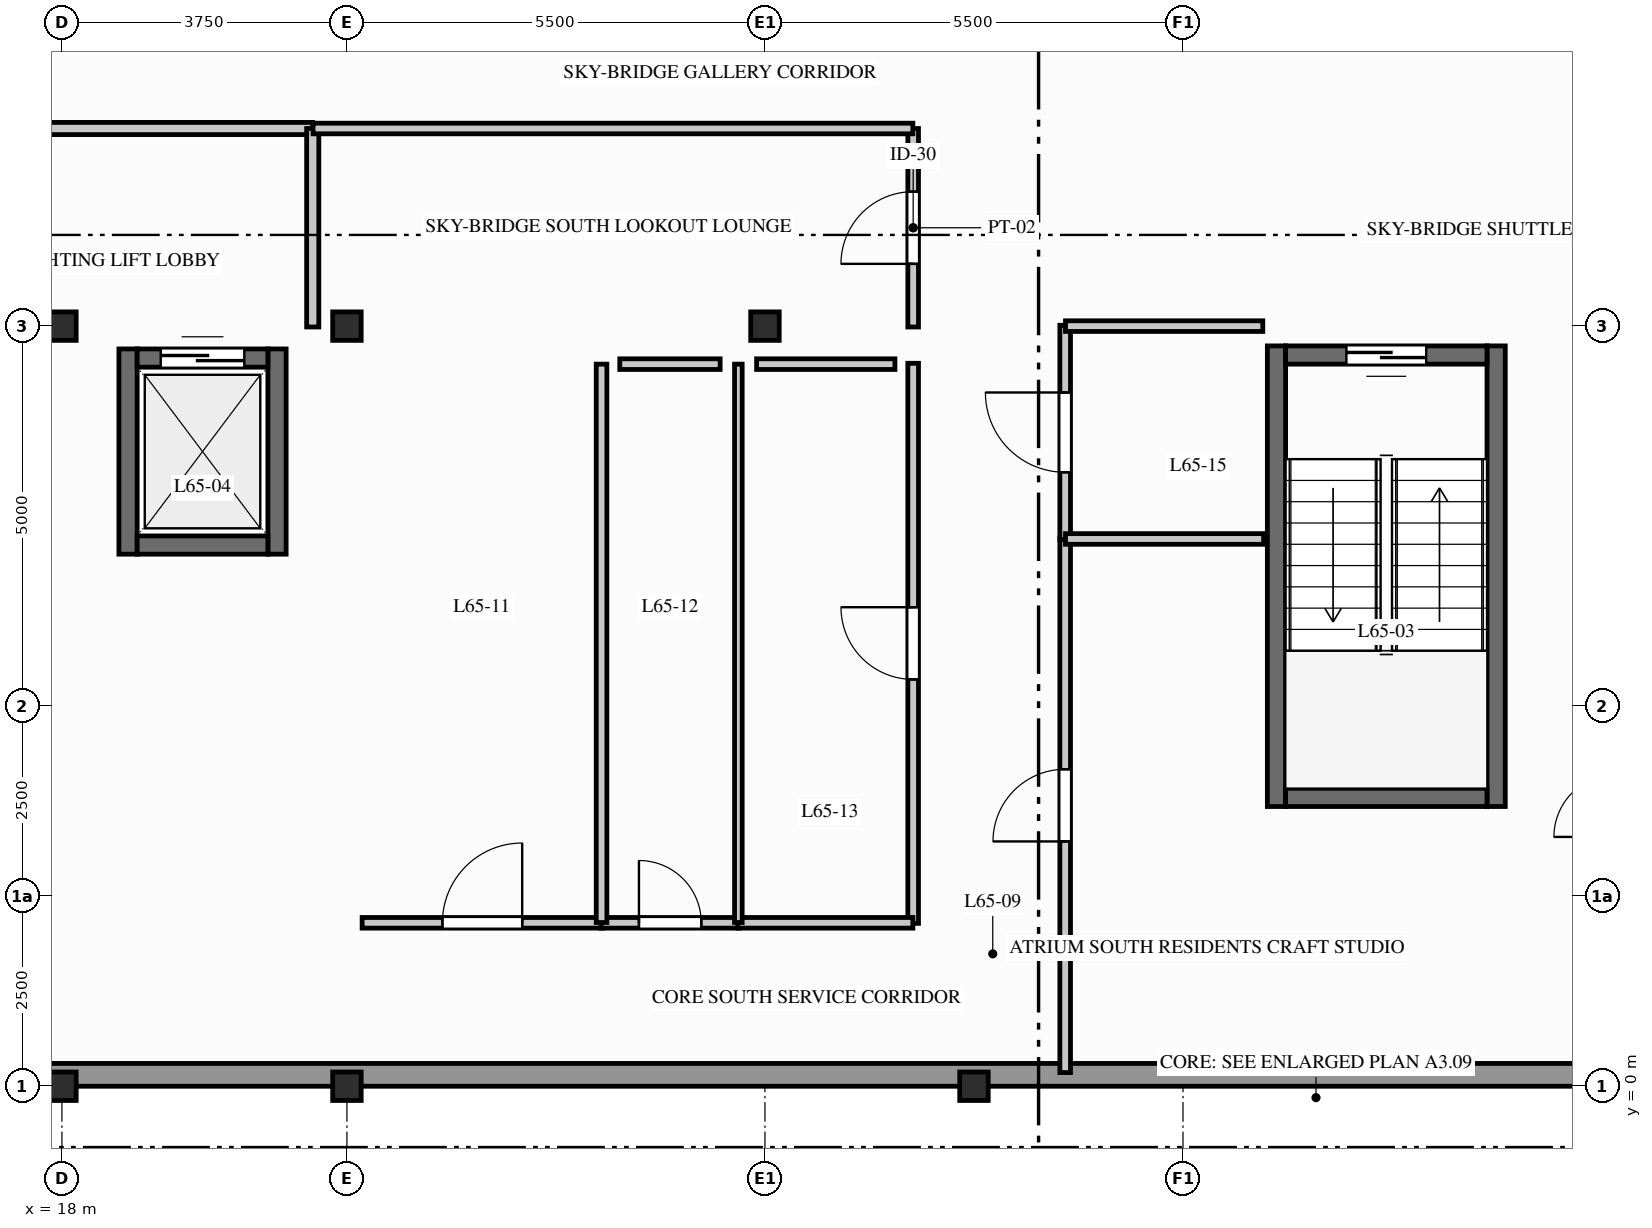
"""IFC4 building model, lengths in metres.
Left out: names, types, materials, properties, quantities, classifications, styles, units other than length and angle.
Written with IfcOpenShell. Run it as: python <this file> out.ifc"""

import sys

from ifc_helpers import new_model, si_unit, direction, frame, frame_2d, origin, origin_2d, place, context, subcontext, project, spatial, rectangle, i_section, extrude, element, fill, save


model = new_model("IFC4")
c1 = context("Model", 3, precision=1e-05, world=origin(), true_north=direction((0.0, 1.0)))
c2 = subcontext(c1, "Body", "Model", "MODEL_VIEW")
j1 = project(units=[si_unit("LENGTHUNIT", "METRE"), si_unit("PLANEANGLEUNIT", "RADIAN")], contexts=[c1])
p1 = place(None, origin())
s1 = spatial("IfcSite", under=j1, at=p1, CompositionType="ELEMENT")
p2 = place(p1, origin())
s2 = spatial("IfcBuilding", under=s1, at=p2, CompositionType="ELEMENT")
p3 = place(p2, frame((0.0, 0.0, 214.4)))
s3 = spatial("IfcBuildingStorey", under=s2, at=p3, CompositionType="ELEMENT", Elevation=214.4)
for number, where, z_axis, x_axis in (
    (1, (18.0, 0.0, 0.0), (0.0, 0.0, 1.0), (1.0, 0.0, 0.0)),
    (2, (18.0, 10.0, 0.0), (0.0, 0.0, 1.0), (1.0, 0.0, 0.0)),
    (3, (21.75, 0.0, 0.0), (0.0, 0.0, 1.0), (1.0, 0.0, 0.0)),
    (4, (21.75, 10.0, 0.0), (0.0, 0.0, 1.0), (1.0, 0.0, 0.0)),
):
    element("IfcColumn", number, at=place(p3, frame(where, z_axis=z_axis, x_axis=x_axis)), inside=s3, PredefinedType="COLUMN", context=c2, shape_type="SweptSolid", body=[
        extrude(i_section(OverallWidth=0.375, OverallDepth=0.375, WebThickness=0.017, FlangeThickness=0.027, FilletRadius=0.015, at=origin_2d()), origin(), (0.0, 0.0, 1.0), 3.6),
    ])
for number, where, z_axis, x_axis in (
    (5, (27.25, 10.0, -0.42), (0.0, 0.0, 1.0), (1.0, 0.0, 0.0)),
    (6, (30.0, 0.0, -0.42), (0.0, 0.0, 1.0), (1.0, 0.0, 0.0)),
):
    element("IfcColumn", number, at=place(p3, frame(where, z_axis=z_axis, x_axis=x_axis)), inside=s3, PredefinedType="COLUMN", context=c2, shape_type="SweptSolid", body=[
        extrude(i_section(OverallWidth=0.375, OverallDepth=0.375, WebThickness=0.017, FlangeThickness=0.027, FilletRadius=0.015, at=origin_2d()), origin(), (0.0, 0.0, 1.0), 4.02),
    ])
p4 = place(p3, frame((2.5, 0.15, 0.0), z_axis=(0.0, 0.0, 1.0), x_axis=(1.0, 0.0, 0.0)))
e7 = element("IfcWall", 7, at=p4, inside=s3, PredefinedType="STANDARD", context=c2, shape_type="SweptSolid", body=[
    extrude(rectangle(XDim=55.0, YDim=0.3, at=frame_2d((27.5, 0.0))), origin(), (0.0, 0.0, 1.0), 2.454),
])
p5 = place(p4, frame((4.85, 0.0, 0.0)))
e8 = element("IfcOpeningElement", 8, at=p5, cuts=e7, PredefinedType="OPENING", context=c2, shape_type="SweptSolid", body=[
    extrude(rectangle(XDim=1.1, YDim=2.2, at=frame_2d((0.55, 1.1))), frame((0.0, 0.16, 0.0), z_axis=(0.0, -1.0, 0.0), x_axis=(1.0, 0.0, 0.0)), (0.0, 0.0, 1.0), 0.32),
])
p6 = place(p4, frame((1.0, 0.0, 0.434)))
e9 = element("IfcOpeningElement", 9, at=p6, cuts=e7, PredefinedType="OPENING", context=c2, shape_type="SweptSolid", body=[
    extrude(rectangle(XDim=1.5, YDim=1.8, at=frame_2d((0.75, 0.9))), frame((0.0, 0.16, 0.0), z_axis=(0.0, -1.0, 0.0), x_axis=(1.0, 0.0, 0.0)), (0.0, 0.0, 1.0), 0.32),
])
p7 = place(p4, frame((47.2, 0.0, 0.334)))
e10 = element("IfcOpeningElement", 10, at=p7, cuts=e7, PredefinedType="OPENING", context=c2, shape_type="SweptSolid", body=[
    extrude(rectangle(XDim=1.65, YDim=1.9, at=frame_2d((0.825, 0.95))), frame((0.0, 0.16, 0.0), z_axis=(0.0, -1.0, 0.0), x_axis=(1.0, 0.0, 0.0)), (0.0, 0.0, 1.0), 0.32),
])
p8 = place(p4, frame((52.3, 0.0, 0.634)))
e11 = element("IfcOpeningElement", 11, at=p8, cuts=e7, PredefinedType="OPENING", context=c2, shape_type="SweptSolid", body=[
    extrude(rectangle(XDim=1.2, YDim=1.6, at=frame_2d((0.6, 0.8))), frame((0.0, 0.16, 0.0), z_axis=(0.0, -1.0, 0.0), x_axis=(1.0, 0.0, 0.0)), (0.0, 0.0, 1.0), 0.32),
])
for number, where, z_axis, x_axis in (
    (12, (33.98, 3.68, 0.0), (0.0, 0.0, 1.0), (0.0, 1.0, 0.0)),
    (13, (36.87, 3.68, 0.0), (0.0, 0.0, 1.0), (0.0, 1.0, 0.0)),
):
    element("IfcWall", number, at=place(p3, frame(where, z_axis=z_axis, x_axis=x_axis)), inside=s3, PredefinedType="SHEAR", context=c2, shape_type="SweptSolid", body=[
        extrude(rectangle(XDim=6.06, YDim=0.24, at=frame_2d((3.03, 0.0))), origin(), (0.0, 0.0, 1.0), 3.33),
    ])
p9 = place(p3, frame((34.1, 3.8, 0.0), z_axis=(0.0, 0.0, 1.0), x_axis=(1.0, 0.0, 0.0)))
e14 = element("IfcWall", 14, at=p9, inside=s3, PredefinedType="SHEAR", context=c2, shape_type="SweptSolid", body=[
    extrude(rectangle(XDim=2.65, YDim=0.24, at=frame_2d((1.325, 0.0))), origin(), (0.0, 0.0, 1.0), 3.33),
])
p10 = place(p3, frame((36.75, 9.62, 0.0), z_axis=(0.0, 0.0, 1.0), x_axis=(-1.0, 0.0, 0.0)))
e15 = element("IfcWall", 15, at=p10, inside=s3, PredefinedType="SHEAR", context=c2, shape_type="SweptSolid", body=[
    extrude(rectangle(XDim=2.65, YDim=0.24, at=frame_2d((1.325, 0.0))), origin(), (0.0, 0.0, 1.0), 3.33),
])
p11 = place(p10, frame((0.8, 0.0, 0.0)))
e16 = element("IfcOpeningElement", 16, at=p11, cuts=e15, PredefinedType="OPENING", context=c2, shape_type="SweptSolid", body=[
    extrude(rectangle(XDim=1.05, YDim=2.06, at=frame_2d((0.525, 1.03))), frame((0.0, 0.13, 0.0), z_axis=(0.0, -1.0, 0.0), x_axis=(1.0, 0.0, 0.0)), (0.0, 0.0, 1.0), 0.26),
])
for number, where, z_axis, x_axis in (
    (17, (18.87, 7.0, 0.0), (0.0, 0.0, 1.0), (0.0, 1.0, 0.0)),
    (18, (20.83, 7.0, 0.0), (0.0, 0.0, 1.0), (0.0, 1.0, 0.0)),
):
    element("IfcWall", number, at=place(p3, frame(where, z_axis=z_axis, x_axis=x_axis)), inside=s3, PredefinedType="SHEAR", context=c2, shape_type="SweptSolid", body=[
        extrude(rectangle(XDim=2.7, YDim=0.24, at=frame_2d((1.35, 0.0))), origin(), (0.0, 0.0, 1.0), 3.33),
    ])
p12 = place(p3, frame((18.99, 7.12, 0.0), z_axis=(0.0, 0.0, 1.0), x_axis=(1.0, 0.0, 0.0)))
e19 = element("IfcWall", 19, at=p12, inside=s3, PredefinedType="SHEAR", context=c2, shape_type="SweptSolid", body=[
    extrude(rectangle(XDim=1.72, YDim=0.24, at=frame_2d((0.86, 0.0))), origin(), (0.0, 0.0, 1.0), 3.33),
])
p13 = place(p3, frame((18.99, 9.58, 0.0), z_axis=(0.0, 0.0, 1.0), x_axis=(1.0, 0.0, 0.0)))
e20 = element("IfcWall", 20, at=p13, inside=s3, PredefinedType="SHEAR", context=c2, shape_type="SweptSolid", body=[
    extrude(rectangle(XDim=1.72, YDim=0.24, at=frame_2d((0.86, 0.0))), origin(), (0.0, 0.0, 1.0), 3.33),
])
p14 = place(p13, frame((0.31, 0.0, 0.0)))
e21 = element("IfcOpeningElement", 21, at=p14, cuts=e20, PredefinedType="OPENING", context=c2, shape_type="SweptSolid", body=[
    extrude(rectangle(XDim=1.1, YDim=2.06, at=frame_2d((0.55, 1.03))), frame((0.0, 0.13, 0.0), z_axis=(0.0, -1.0, 0.0), x_axis=(1.0, 0.0, 0.0)), (0.0, 0.0, 1.0), 0.26),
])
p15 = place(p3, frame((29.2, 2.143, 0.0), z_axis=(0.0, 0.0, 1.0), x_axis=(0.0, 1.0, 0.0)))
e22 = element("IfcWall", 22, at=p15, inside=s3, PredefinedType="PARTITIONING", context=c2, shape_type="SweptSolid", body=[
    extrude(rectangle(XDim=7.369, YDim=0.14, at=frame_2d((3.684, 0.0))), origin(), (0.0, 0.0, 1.0), 3.33),
])
p16 = place(p15, frame((3.209, 0.0, 0.0)))
e23 = element("IfcOpeningElement", 23, at=p16, cuts=e22, PredefinedType="OPENING", context=c2, shape_type="SweptSolid", body=[
    extrude(rectangle(XDim=0.95, YDim=2.05, at=frame_2d((0.475, 1.025))), frame((0.0, 0.08, 0.0), z_axis=(0.0, -1.0, 0.0), x_axis=(1.0, 0.0, 0.0)), (0.0, 0.0, 1.0), 0.16),
])
p17 = place(p3, frame((31.2, 0.18, 0.0), z_axis=(0.0, 0.0, 1.0), x_axis=(0.0, 1.0, 0.0)))
e24 = element("IfcWall", 24, at=p17, inside=s3, PredefinedType="PARTITIONING", context=c2, shape_type="SweptSolid", body=[
    extrude(rectangle(XDim=7.031, YDim=0.14, at=frame_2d((3.516, 0.0))), origin(), (0.0, 0.0, 1.0), 3.33),
])
p18 = place(p17, frame((3.041, 0.0, 0.0)))
e25 = element("IfcOpeningElement", 25, at=p18, cuts=e24, PredefinedType="OPENING", context=c2, shape_type="SweptSolid", body=[
    extrude(rectangle(XDim=0.95, YDim=2.05, at=frame_2d((0.475, 1.025))), frame((0.0, 0.08, 0.0), z_axis=(0.0, -1.0, 0.0), x_axis=(1.0, 0.0, 0.0)), (0.0, 0.0, 1.0), 0.16),
])
p19 = place(p3, frame((31.2, 7.193, 0.0), z_axis=(0.0, 0.0, 1.0), x_axis=(0.0, 1.0, 0.0)))
e26 = element("IfcWall", 26, at=p19, inside=s3, PredefinedType="PARTITIONING", context=c2, shape_type="SweptSolid", body=[
    extrude(rectangle(XDim=2.819, YDim=0.14, at=frame_2d((1.409, 0.0))), origin(), (0.0, 0.0, 1.0), 2.454),
])
p20 = place(p19, frame((0.884, 0.0, 0.0)))
e27 = element("IfcOpeningElement", 27, at=p20, cuts=e26, PredefinedType="OPENING", context=c2, shape_type="SweptSolid", body=[
    extrude(rectangle(XDim=1.05, YDim=2.06, at=frame_2d((0.525, 1.03))), frame((0.0, 0.08, 0.0), z_axis=(0.0, -1.0, 0.0), x_axis=(1.0, 0.0, 0.0)), (0.0, 0.0, 1.0), 0.16),
])
p21 = place(p3, frame((29.2, 9.989, 0.0), z_axis=(0.0, 0.0, 1.0), x_axis=(0.0, 1.0, 0.0)))
e28 = element("IfcWall", 28, at=p21, inside=s3, PredefinedType="PARTITIONING", context=c2, shape_type="SweptSolid", body=[
    extrude(rectangle(XDim=2.611, YDim=0.14, at=frame_2d((1.306, 0.0))), origin(), (0.0, 0.0, 1.0), 2.454),
])
p22 = place(p21, frame((0.831, 0.0, 0.0)))
e29 = element("IfcOpeningElement", 29, at=p22, cuts=e28, PredefinedType="OPENING", context=c2, shape_type="SweptSolid", body=[
    extrude(rectangle(XDim=0.95, YDim=2.05, at=frame_2d((0.475, 1.025))), frame((0.0, 0.08, 0.0), z_axis=(0.0, -1.0, 0.0), x_axis=(1.0, 0.0, 0.0)), (0.0, 0.0, 1.0), 0.16),
])
p23 = place(p3, frame((21.95, 2.15, 0.0), z_axis=(0.0, 0.0, 1.0), x_axis=(1.0, 0.0, 0.0)))
e30 = element("IfcWall", 30, at=p23, inside=s3, PredefinedType="PARTITIONING", context=c2, shape_type="SweptSolid", body=[
    extrude(rectangle(XDim=3.161, YDim=0.14, at=frame_2d((1.581, 0.0))), origin(), (0.0, 0.0, 1.0), 3.33),
])
p24 = place(p23, frame((1.056, 0.0, 0.0)))
e31 = element("IfcOpeningElement", 31, at=p24, cuts=e30, PredefinedType="OPENING", context=c2, shape_type="SweptSolid", body=[
    extrude(rectangle(XDim=1.05, YDim=2.06, at=frame_2d((0.525, 1.03))), frame((0.0, 0.08, 0.0), z_axis=(0.0, -1.0, 0.0), x_axis=(1.0, 0.0, 0.0)), (0.0, 0.0, 1.0), 0.16),
])
p25 = place(p3, frame((25.093, 2.15, 0.0), z_axis=(0.0, 0.0, 1.0), x_axis=(1.0, 0.0, 0.0)))
e32 = element("IfcWall", 32, at=p25, inside=s3, PredefinedType="PARTITIONING", context=c2, shape_type="SweptSolid", body=[
    extrude(rectangle(XDim=1.819, YDim=0.14, at=frame_2d((0.909, 0.0))), origin(), (0.0, 0.0, 1.0), 3.33),
])
p26 = place(p25, frame((0.499, 0.0, 0.0)))
e33 = element("IfcOpeningElement", 33, at=p26, cuts=e32, PredefinedType="OPENING", context=c2, shape_type="SweptSolid", body=[
    extrude(rectangle(XDim=0.82, YDim=2.02, at=frame_2d((0.41, 1.01))), frame((0.0, 0.08, 0.0), z_axis=(0.0, -1.0, 0.0), x_axis=(1.0, 0.0, 0.0)), (0.0, 0.0, 1.0), 0.16),
])
p27 = place(p3, frame((26.893, 2.15, 0.0), z_axis=(0.0, 0.0, 1.0), x_axis=(1.0, 0.0, 0.0)))
e34 = element("IfcWall", 34, at=p27, inside=s3, PredefinedType="PARTITIONING", context=c2, shape_type="SweptSolid", body=[
    extrude(rectangle(XDim=2.303, YDim=0.14, at=frame_2d((1.152, 0.0))), origin(), (0.0, 0.0, 1.0), 3.33),
])
p28 = place(p3, frame((25.1, 2.154, 0.0), z_axis=(0.0, 0.0, 1.0), x_axis=(0.0, 1.0, 0.0)))
e35 = element("IfcWall", 35, at=p28, inside=s3, PredefinedType="PARTITIONING", context=c2, shape_type="SweptSolid", body=[
    extrude(rectangle(XDim=7.346, YDim=0.14, at=frame_2d((3.673, 0.0))), origin(), (0.0, 0.0, 1.0), 3.33),
])
p29 = place(p3, frame((26.9, 2.154, 0.0), z_axis=(0.0, 0.0, 1.0), x_axis=(0.0, 1.0, 0.0)))
e36 = element("IfcWall", 36, at=p29, inside=s3, PredefinedType="PARTITIONING", context=c2, shape_type="SweptSolid", body=[
    extrude(rectangle(XDim=7.346, YDim=0.1, at=frame_2d((3.673, 0.0))), origin(), (0.0, 0.0, 1.0), 3.33),
])
p30 = place(p3, frame((31.204, 7.2, 0.0), z_axis=(0.0, 0.0, 1.0), x_axis=(1.0, 0.0, 0.0)))
e37 = element("IfcWall", 37, at=p30, inside=s3, PredefinedType="PARTITIONING", context=c2, shape_type="SweptSolid", body=[
    extrude(rectangle(XDim=2.607, YDim=0.14, at=frame_2d((1.304, 0.0))), origin(), (0.0, 0.0, 1.0), 3.33),
])
p31 = place(p3, frame((31.204, 10.0, 0.0), z_axis=(0.0, 0.0, 1.0), x_axis=(1.0, 0.0, 0.0)))
e38 = element("IfcWall", 38, at=p31, inside=s3, PredefinedType="PARTITIONING", context=c2, shape_type="SweptSolid", body=[
    extrude(rectangle(XDim=2.596, YDim=0.14, at=frame_2d((1.298, 0.0))), origin(), (0.0, 0.0, 1.0), 2.454),
])
p32 = place(p3, frame((12.3, 12.6, 0.0), z_axis=(0.0, 0.0, 1.0), x_axis=(1.0, 0.0, 0.0)))
e39 = element("IfcWall", 39, at=p32, inside=s3, PredefinedType="PARTITIONING", context=c2, shape_type="SweptSolid", body=[
    extrude(rectangle(XDim=9.0, YDim=0.16, at=frame_2d((4.5, 0.0))), origin(), (0.0, 0.0, 1.0), 2.685),
])
p33 = place(p32, frame((3.975, 0.0, 0.0)))
e40 = element("IfcOpeningElement", 40, at=p33, cuts=e39, PredefinedType="OPENING", context=c2, shape_type="SweptSolid", body=[
    extrude(rectangle(XDim=1.05, YDim=2.06, at=frame_2d((0.525, 1.03))), frame((0.0, 0.09, 0.0), z_axis=(0.0, -1.0, 0.0), x_axis=(1.0, 0.0, 0.0)), (0.0, 0.0, 1.0), 0.18),
])
p34 = place(p3, frame((21.3, 9.989, 0.0), z_axis=(0.0, 0.0, 1.0), x_axis=(0.0, 1.0, 0.0)))
e41 = element("IfcWall", 41, at=p34, inside=s3, PredefinedType="PARTITIONING", context=c2, shape_type="SweptSolid", body=[
    extrude(rectangle(XDim=2.611, YDim=0.16, at=frame_2d((1.306, 0.0))), origin(), (0.0, 0.0, 1.0), 2.685),
])
p35 = place(p3, frame((21.304, 12.6, 0.0), z_axis=(0.0, 0.0, 1.0), x_axis=(1.0, 0.0, 0.0)))
e42 = element("IfcWall", 42, at=p35, inside=s3, PredefinedType="PARTITIONING", context=c2, shape_type="SweptSolid", body=[
    extrude(rectangle(XDim=7.892, YDim=0.14, at=frame_2d((3.946, 0.0))), origin(), (0.0, 0.0, 1.0), 2.685),
])
p36 = place(p3, frame((25.34, 9.5, 0.0), z_axis=(0.0, 0.0, 1.0), x_axis=(1.0, 0.0, 0.0)))
e43 = element("IfcWall", 43, at=p36, inside=s3, PredefinedType="PARTITIONING", context=c2, shape_type="SweptSolid", body=[
    extrude(rectangle(XDim=1.32, YDim=0.14, at=frame_2d((0.66, 0.0))), origin(), (0.0, 0.0, 1.0), 3.33),
])
p37 = place(p3, frame((27.14, 9.5, 0.0), z_axis=(0.0, 0.0, 1.0), x_axis=(1.0, 0.0, 0.0)))
e44 = element("IfcWall", 44, at=p37, inside=s3, PredefinedType="PARTITIONING", context=c2, shape_type="SweptSolid", body=[
    extrude(rectangle(XDim=1.82, YDim=0.14, at=frame_2d((0.91, 0.0))), origin(), (0.0, 0.0, 1.0), 3.33),
])
p38 = place(p11, origin())
e45 = element("IfcDoor", 45, at=p38, inside=s3, OperationType="SINGLE_SWING_RIGHT", PredefinedType="DOOR", context=c2, shape_type="SweptSolid", body=[
    extrude(rectangle(XDim=1.05, YDim=2.06, at=frame_2d((0.525, 1.03))), frame((0.0, 0.025, 0.0), z_axis=(0.0, -1.0, 0.0), x_axis=(1.0, 0.0, 0.0)), (0.0, 0.0, 1.0), 0.05),
])
fill(e16, e45)
p39 = place(p14, origin())
e46 = element("IfcDoor", 46, at=p39, inside=s3, OperationType="SLIDING_TO_LEFT", PredefinedType="DOOR", context=c2, shape_type="SweptSolid", body=[
    extrude(rectangle(XDim=1.1, YDim=2.06, at=frame_2d((0.55, 1.03))), frame((0.0, 0.025, 0.0), z_axis=(0.0, -1.0, 0.0), x_axis=(1.0, 0.0, 0.0)), (0.0, 0.0, 1.0), 0.05),
])
fill(e21, e46)
p40 = place(p16, origin())
e47 = element("IfcDoor", 47, at=p40, inside=s3, OperationType="SINGLE_SWING_RIGHT", PredefinedType="DOOR", context=c2, shape_type="SweptSolid", body=[
    extrude(rectangle(XDim=0.95, YDim=2.05, at=frame_2d((0.475, 1.025))), frame((0.0, 0.025, 0.0), z_axis=(0.0, -1.0, 0.0), x_axis=(1.0, 0.0, 0.0)), (0.0, 0.0, 1.0), 0.05),
])
fill(e23, e47)
p41 = place(p18, origin())
e48 = element("IfcDoor", 48, at=p41, inside=s3, OperationType="SINGLE_SWING_LEFT", PredefinedType="DOOR", context=c2, shape_type="SweptSolid", body=[
    extrude(rectangle(XDim=0.95, YDim=2.05, at=frame_2d((0.475, 1.025))), frame((0.0, 0.025, 0.0), z_axis=(0.0, -1.0, 0.0), x_axis=(1.0, 0.0, 0.0)), (0.0, 0.0, 1.0), 0.05),
])
fill(e25, e48)
p42 = place(p20, origin())
e49 = element("IfcDoor", 49, at=p42, inside=s3, OperationType="SINGLE_SWING_RIGHT", PredefinedType="DOOR", context=c2, shape_type="SweptSolid", body=[
    extrude(rectangle(XDim=1.05, YDim=2.06, at=frame_2d((0.525, 1.03))), frame((0.0, 0.025, 0.0), z_axis=(0.0, -1.0, 0.0), x_axis=(1.0, 0.0, 0.0)), (0.0, 0.0, 1.0), 0.05),
])
fill(e27, e49)
p43 = place(p22, origin())
e50 = element("IfcDoor", 50, at=p43, inside=s3, OperationType="SINGLE_SWING_LEFT", PredefinedType="DOOR", context=c2, shape_type="SweptSolid", body=[
    extrude(rectangle(XDim=0.95, YDim=2.05, at=frame_2d((0.475, 1.025))), frame((0.0, 0.025, 0.0), z_axis=(0.0, -1.0, 0.0), x_axis=(1.0, 0.0, 0.0)), (0.0, 0.0, 1.0), 0.05),
])
fill(e29, e50)
p44 = place(p24, origin())
e51 = element("IfcDoor", 51, at=p44, inside=s3, OperationType="SINGLE_SWING_RIGHT", PredefinedType="DOOR", context=c2, shape_type="SweptSolid", body=[
    extrude(rectangle(XDim=1.05, YDim=2.06, at=frame_2d((0.525, 1.03))), frame((0.0, 0.025, 0.0), z_axis=(0.0, -1.0, 0.0), x_axis=(1.0, 0.0, 0.0)), (0.0, 0.0, 1.0), 0.05),
])
fill(e31, e51)
p45 = place(p26, origin())
e52 = element("IfcDoor", 52, at=p45, inside=s3, OperationType="SINGLE_SWING_LEFT", PredefinedType="DOOR", context=c2, shape_type="SweptSolid", body=[
    extrude(rectangle(XDim=0.82, YDim=2.02, at=frame_2d((0.41, 1.01))), frame((0.0, 0.025, 0.0), z_axis=(0.0, -1.0, 0.0), x_axis=(1.0, 0.0, 0.0)), (0.0, 0.0, 1.0), 0.05),
])
fill(e33, e52)
save(model, sys.argv[1])
